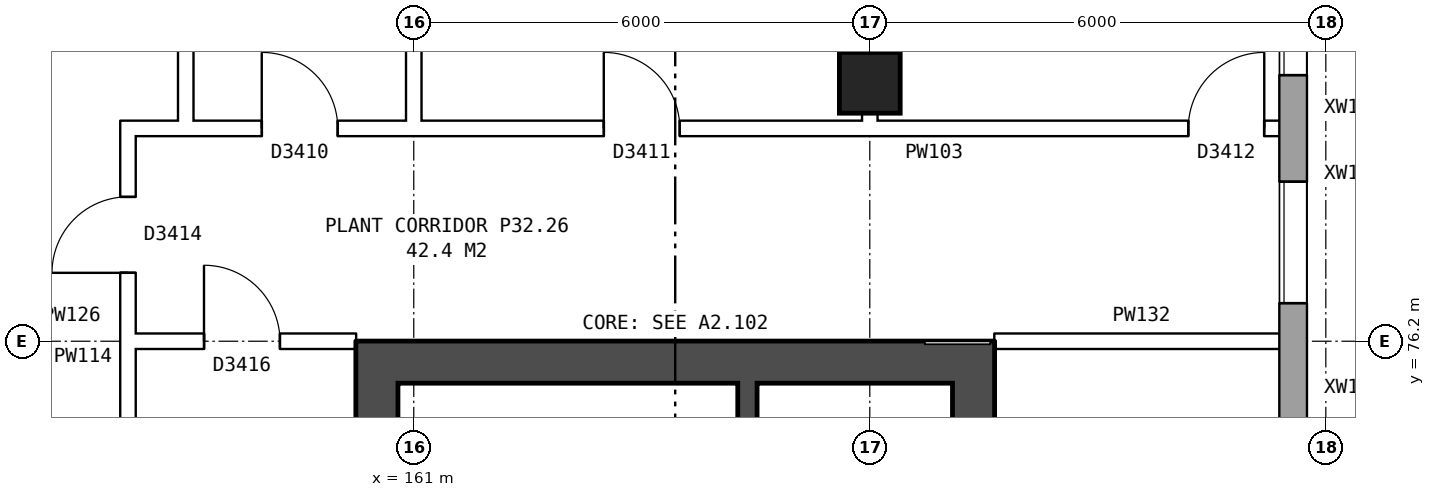
"""IFC4 building model, lengths in metres.
Left out: names, types, materials, properties, quantities, classifications, styles, units other than length and angle.
Written with IfcOpenShell. Run it as: python <this file> out.ifc"""

import sys

from ifc_helpers import new_model, si_unit, direction, frame, frame_2d, origin, origin_2d, place, context, subcontext, project, spatial, rectangle, extrude, element, fill, save


model = new_model("IFC4")
c1 = context("Model", 3, precision=1e-05, world=origin(), true_north=direction((0.0, 1.0)))
c2 = subcontext(c1, "Body", "Model", "MODEL_VIEW")
j1 = project(units=[si_unit("LENGTHUNIT", "METRE"), si_unit("PLANEANGLEUNIT", "RADIAN")], contexts=[c1])
p1 = place(None, origin())
s1 = spatial("IfcSite", under=j1, at=p1, CompositionType="ELEMENT")
p2 = place(p1, origin())
s2 = spatial("IfcBuilding", under=s1, at=p2, CompositionType="ELEMENT")
p3 = place(p2, frame((0.0, 0.0, 115.0)))
s3 = spatial("IfcBuildingStorey", under=s2, at=p3, CompositionType="ELEMENT", Elevation=115.0)
p4 = place(p3, frame((167.0, 79.6, 0.0), z_axis=(0.0, 0.0, 1.0), x_axis=(1.0, 0.0, 0.0)))
e1 = element("IfcColumn", 1, at=p4, inside=s3, PredefinedType="COLUMN", context=c2, shape_type="SweptSolid", body=[
    extrude(rectangle(XDim=0.8, YDim=0.8, at=origin_2d()), origin(), (0.0, 0.0, 1.0), 4.2),
])
p5 = place(p3, frame((172.57, 57.075, 0.0), z_axis=(0.0, 0.0, 1.0), x_axis=(0.0, 1.0, 0.0)))
e2 = element("IfcWall", 2, at=p5, inside=s3, PredefinedType="STANDARD", context=c2, shape_type="SweptSolid", body=[
    extrude(rectangle(XDim=25.851, YDim=0.36, at=frame_2d((12.925, 0.0))), origin(), (0.0, 0.0, 1.0), 4.2),
])
p6 = place(p5, frame((2.6, 0.0, 1.5)))
e3 = element("IfcOpeningElement", 3, at=p6, cuts=e2, PredefinedType="OPENING", context=c2, shape_type="SweptSolid", body=[
    extrude(rectangle(XDim=0.9, YDim=1.2, at=frame_2d((0.45, 0.6))), frame((0.0, 0.19, 0.0), z_axis=(0.0, -1.0, 0.0), x_axis=(1.0, 0.0, 0.0)), (0.0, 0.0, 1.0), 0.38),
])
p7 = place(p5, frame((3.925, 0.0, 1.5)))
e4 = element("IfcOpeningElement", 4, at=p7, cuts=e2, PredefinedType="OPENING", context=c2, shape_type="SweptSolid", body=[
    extrude(rectangle(XDim=0.6, YDim=1.2, at=frame_2d((0.3, 0.6))), frame((0.0, 0.19, 0.0), z_axis=(0.0, -1.0, 0.0), x_axis=(1.0, 0.0, 0.0)), (0.0, 0.0, 1.0), 0.38),
])
p8 = place(p5, frame((7.625, 0.0, 1.5)))
e5 = element("IfcOpeningElement", 5, at=p8, cuts=e2, PredefinedType="OPENING", context=c2, shape_type="SweptSolid", body=[
    extrude(rectangle(XDim=1.6, YDim=1.2, at=frame_2d((0.8, 0.6))), frame((0.0, 0.19, 0.0), z_axis=(0.0, -1.0, 0.0), x_axis=(1.0, 0.0, 0.0)), (0.0, 0.0, 1.0), 0.38),
])
p9 = place(p5, frame((10.625, 0.0, 1.5)))
e6 = element("IfcOpeningElement", 6, at=p9, cuts=e2, PredefinedType="OPENING", context=c2, shape_type="SweptSolid", body=[
    extrude(rectangle(XDim=1.6, YDim=1.2, at=frame_2d((0.8, 0.6))), frame((0.0, 0.19, 0.0), z_axis=(0.0, -1.0, 0.0), x_axis=(1.0, 0.0, 0.0)), (0.0, 0.0, 1.0), 0.38),
])
p10 = place(p5, frame((9.525, 0.0, 1.5)))
e7 = element("IfcOpeningElement", 7, at=p10, cuts=e2, PredefinedType="OPENING", context=c2, shape_type="SweptSolid", body=[
    extrude(rectangle(XDim=0.6, YDim=1.2, at=frame_2d((0.3, 0.6))), frame((0.0, 0.19, 0.0), z_axis=(0.0, -1.0, 0.0), x_axis=(1.0, 0.0, 0.0)), (0.0, 0.0, 1.0), 0.38),
])
p11 = place(p5, frame((14.975, 0.0, 1.5)))
e8 = element("IfcOpeningElement", 8, at=p11, cuts=e2, PredefinedType="OPENING", context=c2, shape_type="SweptSolid", body=[
    extrude(rectangle(XDim=0.6, YDim=1.2, at=frame_2d((0.3, 0.6))), frame((0.0, 0.19, 0.0), z_axis=(0.0, -1.0, 0.0), x_axis=(1.0, 0.0, 0.0)), (0.0, 0.0, 1.0), 0.38),
])
p12 = place(p5, frame((19.625, 0.0, 1.5)))
e9 = element("IfcOpeningElement", 9, at=p12, cuts=e2, PredefinedType="OPENING", context=c2, shape_type="SweptSolid", body=[
    extrude(rectangle(XDim=1.6, YDim=1.2, at=frame_2d((0.8, 0.6))), frame((0.0, 0.19, 0.0), z_axis=(0.0, -1.0, 0.0), x_axis=(1.0, 0.0, 0.0)), (0.0, 0.0, 1.0), 0.38),
])
p13 = place(p5, frame((22.625, 0.0, 1.5)))
e10 = element("IfcOpeningElement", 10, at=p13, cuts=e2, PredefinedType="OPENING", context=c2, shape_type="SweptSolid", body=[
    extrude(rectangle(XDim=1.6, YDim=1.2, at=frame_2d((0.8, 0.6))), frame((0.0, 0.19, 0.0), z_axis=(0.0, -1.0, 0.0), x_axis=(1.0, 0.0, 0.0)), (0.0, 0.0, 1.0), 0.38),
])
p14 = place(p5, frame((15.875, 0.0, 1.5)))
e11 = element("IfcOpeningElement", 11, at=p14, cuts=e2, PredefinedType="OPENING", context=c2, shape_type="SweptSolid", body=[
    extrude(rectangle(XDim=1.2, YDim=1.2, at=frame_2d((0.6, 0.6))), frame((0.0, 0.19, 0.0), z_axis=(0.0, -1.0, 0.0), x_axis=(1.0, 0.0, 0.0)), (0.0, 0.0, 1.0), 0.38),
])
p15 = place(p3, frame((160.515, 76.2, 0.0), z_axis=(0.0, 0.0, 1.0), x_axis=(0.0, -1.0, 0.0)))
e12 = element("IfcWall", 12, at=p15, inside=s3, PredefinedType="SHEAR", context=c2, shape_type="SweptSolid", body=[
    extrude(rectangle(XDim=12.4, YDim=0.55, at=frame_2d((6.2, 0.0))), origin(), (0.0, 0.0, 1.0), 4.2),
])
p16 = place(p15, frame((1.325, 0.0, 0.0)))
e13 = element("IfcOpeningElement", 13, at=p16, cuts=e12, PredefinedType="OPENING", context=c2, shape_type="SweptSolid", body=[
    extrude(rectangle(XDim=1.1, YDim=2.1, at=frame_2d((0.55, 1.05))), frame((0.0, 0.285, 0.0), z_axis=(0.0, -1.0, 0.0), x_axis=(1.0, 0.0, 0.0)), (0.0, 0.0, 1.0), 0.57),
])
p17 = place(p15, frame((9.9, 0.0, 0.0)))
e14 = element("IfcOpeningElement", 14, at=p17, cuts=e12, PredefinedType="OPENING", context=c2, shape_type="SweptSolid", body=[
    extrude(rectangle(XDim=1.1, YDim=2.1, at=frame_2d((0.55, 1.05))), frame((0.0, 0.285, 0.0), z_axis=(0.0, -1.0, 0.0), x_axis=(1.0, 0.0, 0.0)), (0.0, 0.0, 1.0), 0.57),
])
p18 = place(p15, frame((8.125, 0.0, 0.0)))
e15 = element("IfcOpeningElement", 15, at=p18, cuts=e12, PredefinedType="OPENING", context=c2, shape_type="SweptSolid", body=[
    extrude(rectangle(XDim=0.85, YDim=2.1, at=frame_2d((0.425, 1.05))), frame((0.0, 0.285, 0.0), z_axis=(0.0, -1.0, 0.0), x_axis=(1.0, 0.0, 0.0)), (0.0, 0.0, 1.0), 0.57),
])
p19 = place(p3, frame((168.365, 76.2, 0.0), z_axis=(0.0, 0.0, 1.0), x_axis=(0.0, -1.0, 0.0)))
e16 = element("IfcWall", 16, at=p19, inside=s3, PredefinedType="SHEAR", context=c2, shape_type="SweptSolid", body=[
    extrude(rectangle(XDim=12.4, YDim=0.55, at=frame_2d((6.2, 0.0))), origin(), (0.0, 0.0, 1.0), 4.2),
])
p20 = place(p3, frame((160.79, 75.925, 0.0), z_axis=(0.0, 0.0, 1.0), x_axis=(1.0, 0.0, 0.0)))
e17 = element("IfcWall", 17, at=p20, inside=s3, PredefinedType="SHEAR", context=c2, shape_type="SweptSolid", body=[
    extrude(rectangle(XDim=7.3, YDim=0.55, at=frame_2d((3.65, 0.0))), origin(), (0.0, 0.0, 1.0), 4.2),
])
p21 = place(p3, frame((165.39, 75.65, 0.0), z_axis=(0.0, 0.0, 1.0), x_axis=(0.0, -1.0, 0.0)))
e18 = element("IfcWall", 18, at=p21, inside=s3, PredefinedType="SHEAR", context=c2, shape_type="SweptSolid", body=[
    extrude(rectangle(XDim=6.775, YDim=0.25, at=frame_2d((3.387, 0.0))), origin(), (0.0, 0.0, 1.0), 4.2),
])
p22 = place(p3, frame((157.24, 63.9, 0.0), z_axis=(0.0, 0.0, 1.0), x_axis=(0.0, 1.0, 0.0)))
e19 = element("IfcWall", 19, at=p22, inside=s3, PredefinedType="PARTITIONING", context=c2, shape_type="SweptSolid", body=[
    extrude(rectangle(XDim=12.2, YDim=0.2, at=frame_2d((6.1, 0.0))), origin(), (0.0, 0.0, 1.0), 4.2),
])
p23 = place(p22, frame((5.1, 0.0, 0.0)))
e20 = element("IfcOpeningElement", 20, at=p23, cuts=e19, PredefinedType="OPENING", context=c2, shape_type="SweptSolid", body=[
    extrude(rectangle(XDim=2.0, YDim=2.1, at=frame_2d((1.0, 1.05))), frame((0.0, 0.11, 0.0), z_axis=(0.0, -1.0, 0.0), x_axis=(1.0, 0.0, 0.0)), (0.0, 0.0, 1.0), 0.22),
])
p24 = place(p3, frame((168.64, 76.2, 0.0), z_axis=(0.0, 0.0, 1.0), x_axis=(1.0, 0.0, 0.0)))
e21 = element("IfcWall", 21, at=p24, inside=s3, PredefinedType="PARTITIONING", context=c2, shape_type="SweptSolid", body=[
    extrude(rectangle(XDim=3.87, YDim=0.2, at=frame_2d((1.935, 0.0))), origin(), (0.0, 0.0, 1.0), 4.2),
])
p25 = place(p3, frame((157.14, 76.2, 0.0), z_axis=(0.0, 0.0, 1.0), x_axis=(1.0, 0.0, 0.0)))
e22 = element("IfcWall", 22, at=p25, inside=s3, PredefinedType="PARTITIONING", context=c2, shape_type="SweptSolid", body=[
    extrude(rectangle(XDim=3.1, YDim=0.2, at=frame_2d((1.55, 0.0))), origin(), (0.0, 0.0, 1.0), 4.2),
])
p26 = place(p25, frame((1.1, 0.0, 0.0)))
e23 = element("IfcOpeningElement", 23, at=p26, cuts=e22, PredefinedType="OPENING", context=c2, shape_type="SweptSolid", body=[
    extrude(rectangle(XDim=1.0, YDim=2.1, at=frame_2d((0.5, 1.05))), frame((0.0, 0.11, 0.0), z_axis=(0.0, -1.0, 0.0), x_axis=(1.0, 0.0, 0.0)), (0.0, 0.0, 1.0), 0.22),
])
p27 = place(p3, frame((157.14, 79.0, 0.0), z_axis=(0.0, 0.0, 1.0), x_axis=(1.0, 0.0, 0.0)))
e24 = element("IfcWall", 24, at=p27, inside=s3, PredefinedType="PARTITIONING", context=c2, shape_type="SweptSolid", body=[
    extrude(rectangle(XDim=15.37, YDim=0.2, at=frame_2d((7.685, 0.0))), origin(), (0.0, 0.0, 1.0), 4.2),
])
p28 = place(p27, frame((1.86, 0.0, 0.0)))
e25 = element("IfcOpeningElement", 25, at=p28, cuts=e24, PredefinedType="OPENING", context=c2, shape_type="SweptSolid", body=[
    extrude(rectangle(XDim=1.0, YDim=2.1, at=frame_2d((0.5, 1.05))), frame((0.0, 0.11, 0.0), z_axis=(0.0, -1.0, 0.0), x_axis=(1.0, 0.0, 0.0)), (0.0, 0.0, 1.0), 0.22),
])
p29 = place(p27, frame((6.36, 0.0, 0.0)))
e26 = element("IfcOpeningElement", 26, at=p29, cuts=e24, PredefinedType="OPENING", context=c2, shape_type="SweptSolid", body=[
    extrude(rectangle(XDim=1.0, YDim=2.1, at=frame_2d((0.5, 1.05))), frame((0.0, 0.11, 0.0), z_axis=(0.0, -1.0, 0.0), x_axis=(1.0, 0.0, 0.0)), (0.0, 0.0, 1.0), 0.22),
])
p30 = place(p27, frame((14.05, 0.0, 0.0)))
e27 = element("IfcOpeningElement", 27, at=p30, cuts=e24, PredefinedType="OPENING", context=c2, shape_type="SweptSolid", body=[
    extrude(rectangle(XDim=1.0, YDim=2.1, at=frame_2d((0.5, 1.05))), frame((0.0, 0.11, 0.0), z_axis=(0.0, -1.0, 0.0), x_axis=(1.0, 0.0, 0.0)), (0.0, 0.0, 1.0), 0.22),
])
p31 = place(p3, frame((157.24, 76.1, 0.0), z_axis=(0.0, 0.0, 1.0), x_axis=(0.0, 1.0, 0.0)))
e28 = element("IfcWall", 28, at=p31, inside=s3, PredefinedType="PARTITIONING", context=c2, shape_type="SweptSolid", body=[
    extrude(rectangle(XDim=3.0, YDim=0.2, at=frame_2d((1.5, 0.0))), origin(), (0.0, 0.0, 1.0), 4.2),
])
p32 = place(p31, frame((1.0, 0.0, 0.0)))
e29 = element("IfcOpeningElement", 29, at=p32, cuts=e28, PredefinedType="OPENING", context=c2, shape_type="SweptSolid", body=[
    extrude(rectangle(XDim=1.0, YDim=2.1, at=frame_2d((0.5, 1.05))), frame((0.0, 0.11, 0.0), z_axis=(0.0, -1.0, 0.0), x_axis=(1.0, 0.0, 0.0)), (0.0, 0.0, 1.0), 0.22),
])
for number, where, z_axis, x_axis in (
    (30, (158.0, 78.9, 0.0), (0.0, 0.0, 1.0), (0.0, 1.0, 0.0)),
    (31, (161.0, 78.9, 0.0), (0.0, 0.0, 1.0), (0.0, 1.0, 0.0)),
    (32, (167.0, 78.9, 0.0), (0.0, 0.0, 1.0), (0.0, 1.0, 0.0)),
):
    element("IfcWall", number, at=place(p3, frame(where, z_axis=z_axis, x_axis=x_axis)), inside=s3, PredefinedType="PARTITIONING", context=c2, shape_type="SweptSolid", body=[
        extrude(rectangle(XDim=6.86, YDim=0.2, at=frame_2d((3.43, 0.0))), origin(), (0.0, 0.0, 1.0), 4.2),
    ])
p33 = place(p12, origin())
e33 = element("IfcWindow", 33, at=p33, inside=s3, PartitioningType="DOUBLE_PANEL_HORIZONTAL", PredefinedType="WINDOW", context=c2, shape_type="SweptSolid", body=[
    extrude(rectangle(XDim=1.6, YDim=1.2, at=frame_2d((0.8, 0.6))), frame((0.0, 0.15, 0.0), z_axis=(0.0, -1.0, 0.0), x_axis=(1.0, 0.0, 0.0)), (0.0, 0.0, 1.0), 0.06),
])
fill(e9, e33)
p34 = place(p13, origin())
e34 = element("IfcWindow", 34, at=p34, inside=s3, PartitioningType="DOUBLE_PANEL_HORIZONTAL", PredefinedType="WINDOW", context=c2, shape_type="SweptSolid", body=[
    extrude(rectangle(XDim=1.6, YDim=1.2, at=frame_2d((0.8, 0.6))), frame((0.0, 0.15, 0.0), z_axis=(0.0, -1.0, 0.0), x_axis=(1.0, 0.0, 0.0)), (0.0, 0.0, 1.0), 0.06),
])
fill(e10, e34)
p35 = place(p26, origin())
e35 = element("IfcDoor", 35, at=p35, inside=s3, OperationType="SINGLE_SWING_LEFT", PredefinedType="DOOR", context=c2, shape_type="SweptSolid", body=[
    extrude(rectangle(XDim=1.0, YDim=2.1, at=frame_2d((0.5, 1.05))), frame((0.0, 0.025, 0.0), z_axis=(0.0, -1.0, 0.0), x_axis=(1.0, 0.0, 0.0)), (0.0, 0.0, 1.0), 0.05),
])
fill(e23, e35)
p36 = place(p28, origin())
e36 = element("IfcDoor", 36, at=p36, inside=s3, OperationType="SINGLE_SWING_LEFT", PredefinedType="DOOR", context=c2, shape_type="SweptSolid", body=[
    extrude(rectangle(XDim=1.0, YDim=2.1, at=frame_2d((0.5, 1.05))), frame((0.0, 0.025, 0.0), z_axis=(0.0, -1.0, 0.0), x_axis=(1.0, 0.0, 0.0)), (0.0, 0.0, 1.0), 0.05),
])
fill(e25, e36)
p37 = place(p29, origin())
e37 = element("IfcDoor", 37, at=p37, inside=s3, OperationType="SINGLE_SWING_LEFT", PredefinedType="DOOR", context=c2, shape_type="SweptSolid", body=[
    extrude(rectangle(XDim=1.0, YDim=2.1, at=frame_2d((0.5, 1.05))), frame((0.0, 0.025, 0.0), z_axis=(0.0, -1.0, 0.0), x_axis=(1.0, 0.0, 0.0)), (0.0, 0.0, 1.0), 0.05),
])
fill(e26, e37)
p38 = place(p30, origin())
e38 = element("IfcDoor", 38, at=p38, inside=s3, OperationType="SINGLE_SWING_RIGHT", PredefinedType="DOOR", context=c2, shape_type="SweptSolid", body=[
    extrude(rectangle(XDim=1.0, YDim=2.1, at=frame_2d((0.5, 1.05))), frame((0.0, 0.025, 0.0), z_axis=(0.0, -1.0, 0.0), x_axis=(1.0, 0.0, 0.0)), (0.0, 0.0, 1.0), 0.05),
])
fill(e27, e38)
p39 = place(p32, origin())
e39 = element("IfcDoor", 39, at=p39, inside=s3, OperationType="SINGLE_SWING_LEFT", PredefinedType="DOOR", context=c2, shape_type="SweptSolid", body=[
    extrude(rectangle(XDim=1.0, YDim=2.1, at=frame_2d((0.5, 1.05))), frame((0.0, 0.025, 0.0), z_axis=(0.0, -1.0, 0.0), x_axis=(1.0, 0.0, 0.0)), (0.0, 0.0, 1.0), 0.05),
])
fill(e29, e39)
save(model, sys.argv[1])
